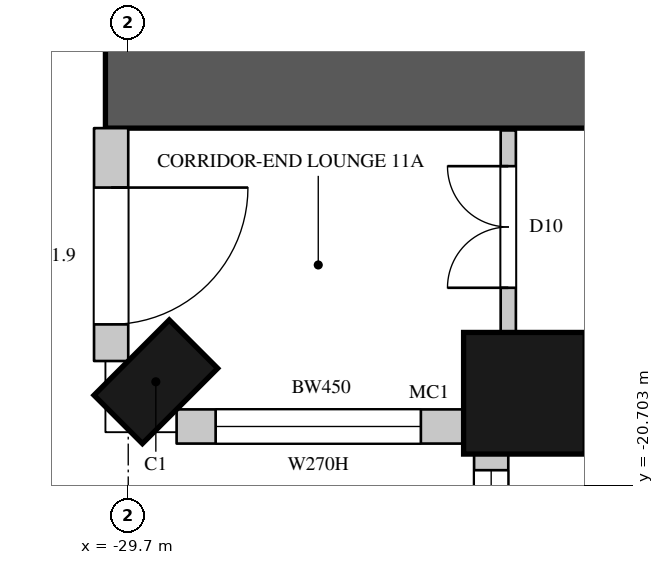
"""IFC4 building model, lengths in metres.
Left out: names, types, materials, properties, quantities, classifications, styles, units other than length and angle.
Written with IfcOpenShell. Run it as: python <this file> out.ifc"""

import sys

from ifc_helpers import new_model, si_unit, direction, frame, frame_2d, origin, origin_2d, place, context, subcontext, project, spatial, rectangle, circle, extrude, element, fill, save


model = new_model("IFC4")
c1 = context("Model", 3, precision=1e-05, world=origin(), true_north=direction((0.0, 1.0)))
c2 = subcontext(c1, "Body", "Model", "MODEL_VIEW")
j1 = project(units=[si_unit("LENGTHUNIT", "METRE"), si_unit("PLANEANGLEUNIT", "RADIAN")], contexts=[c1])
p1 = place(None, origin())
s1 = spatial("IfcSite", under=j1, at=p1, CompositionType="ELEMENT")
p2 = place(p1, origin())
s2 = spatial("IfcBuilding", under=s1, at=p2, CompositionType="ELEMENT")
p3 = place(p2, frame((0.0, 0.0, 69.9)))
s3 = spatial("IfcBuildingStorey", under=s2, at=p3, CompositionType="ELEMENT", Elevation=69.9)
p4 = place(p3, frame((-29.337, -19.337, 0.0), z_axis=(0.0, 0.0, 1.0), x_axis=(0.707106781187, -0.707106781187, 0.0)))
e1 = element("IfcColumn", 1, at=p4, inside=s3, PredefinedType="COLUMN", context=c2, shape_type="SweptSolid", body=[
    extrude(rectangle(XDim=0.9, YDim=1.4, at=origin_2d()), origin(), (0.0, 0.0, 1.0), 3.6),
])
p5 = place(p3, frame((-24.488, -19.488, 0.0), z_axis=(0.0, 0.0, 1.0), x_axis=(1.0, 0.0, 0.0)))
e2 = element("IfcColumn", 2, at=p5, inside=s3, PredefinedType="COLUMN", context=c2, shape_type="SweptSolid", body=[
    extrude(circle(Radius=0.8, at=origin_2d()), origin(), (0.0, 0.0, 1.0), 3.6),
])
p6 = place(p3, frame((-29.925, -16.0, 0.0), z_axis=(0.0, 0.0, 1.0), x_axis=(0.0, -1.0, 0.0)))
e3 = element("IfcWall", 3, at=p6, inside=s3, PredefinedType="SOLIDWALL", context=c2, shape_type="SweptSolid", body=[
    extrude(rectangle(XDim=3.064, YDim=0.45, at=frame_2d((1.532, 0.0))), origin(), (0.0, 0.0, 1.0), 3.3),
])
p7 = place(p6, frame((0.782, 0.0, 0.0)))
e4 = element("IfcOpeningElement", 4, at=p7, cuts=e3, PredefinedType="OPENING", context=c2, shape_type="SweptSolid", body=[
    extrude(rectangle(XDim=1.8, YDim=2.4, at=frame_2d((0.9, 1.2))), frame((0.0, 0.235, 0.0), z_axis=(0.0, -1.0, 0.0), x_axis=(1.0, 0.0, 0.0)), (0.0, 0.0, 1.0), 0.47),
])
p8 = place(p3, frame((-29.064, -19.925, 0.0), z_axis=(0.0, 0.0, 1.0), x_axis=(1.0, 0.0, 0.0)))
e5 = element("IfcWall", 5, at=p8, inside=s3, PredefinedType="SOLIDWALL", context=c2, shape_type="SweptSolid", body=[
    extrude(rectangle(XDim=3.805, YDim=0.45, at=frame_2d((1.903, 0.0))), origin(), (0.0, 0.0, 1.0), 3.3),
])
p9 = place(p8, frame((0.514, 0.0, 1.05)))
e6 = element("IfcOpeningElement", 6, at=p9, cuts=e5, PredefinedType="OPENING", context=c2, shape_type="SweptSolid", body=[
    extrude(rectangle(XDim=2.7, YDim=2.0, at=frame_2d((1.35, 1.0))), frame((0.0, 0.235, 0.0), z_axis=(0.0, -1.0, 0.0), x_axis=(1.0, 0.0, 0.0)), (0.0, 0.0, 1.0), 0.47),
])
p10 = place(p3, frame((-24.925, -20.259, 0.0), z_axis=(0.0, 0.0, 1.0), x_axis=(0.0, -1.0, 0.0)))
e7 = element("IfcWall", 7, at=p10, inside=s3, PredefinedType="SOLIDWALL", context=c2, shape_type="SweptSolid", body=[
    extrude(rectangle(XDim=1.792, YDim=0.45, at=frame_2d((0.896, 0.0))), origin(), (0.0, 0.0, 1.0), 3.3),
])
p11 = place(p10, frame((0.241, 0.0, 1.05)))
e8 = element("IfcOpeningElement", 8, at=p11, cuts=e7, PredefinedType="OPENING", context=c2, shape_type="SweptSolid", body=[
    extrude(rectangle(XDim=1.2, YDim=2.0, at=frame_2d((0.6, 1.0))), frame((0.0, 0.235, 0.0), z_axis=(0.0, -1.0, 0.0), x_axis=(1.0, 0.0, 0.0)), (0.0, 0.0, 1.0), 0.47),
])
p12 = place(p3, frame((-30.0, -15.4, 0.0), z_axis=(0.0, 0.0, 1.0), x_axis=(1.0, 0.0, 0.0)))
e9 = element("IfcWall", 9, at=p12, inside=s3, PredefinedType="SHEAR", context=c2, shape_type="SweptSolid", body=[
    extrude(rectangle(XDim=16.0, YDim=1.2, at=frame_2d((8.0, 0.0))), origin(), (0.0, 0.0, 1.0), 3.6),
])
p13 = place(p12, frame((13.4, 0.0, 0.0)))
e10 = element("IfcOpeningElement", 10, at=p13, cuts=e9, PredefinedType="OPENING", context=c2, shape_type="SweptSolid", body=[
    extrude(rectangle(XDim=1.5, YDim=2.4, at=frame_2d((0.75, 1.2))), frame((0.0, 0.61, 0.0), z_axis=(0.0, -1.0, 0.0), x_axis=(1.0, 0.0, 0.0)), (0.0, 0.0, 1.0), 1.22),
])
p14 = place(p3, frame((-24.7, -18.7, 0.0), z_axis=(0.0, 0.0, 1.0), x_axis=(0.0, 1.0, 0.0)))
e11 = element("IfcWall", 11, at=p14, inside=s3, PredefinedType="PARTITIONING", context=c2, shape_type="SweptSolid", body=[
    extrude(rectangle(XDim=2.67, YDim=0.2, at=frame_2d((1.335, 0.0))), origin(), (0.0, 0.0, 1.0), 3.3),
])
p15 = place(p14, frame((0.6, 0.0, 0.0)))
e12 = element("IfcOpeningElement", 12, at=p15, cuts=e11, PredefinedType="OPENING", context=c2, shape_type="SweptSolid", body=[
    extrude(rectangle(XDim=1.6, YDim=2.4, at=frame_2d((0.8, 1.2))), frame((0.0, 0.11, 0.0), z_axis=(0.0, -1.0, 0.0), x_axis=(1.0, 0.0, 0.0)), (0.0, 0.0, 1.0), 0.22),
])
p16 = place(p3, frame((-23.7, -19.7, 0.0), z_axis=(0.0, 0.0, 1.0), x_axis=(1.0, 0.0, 0.0)))
e13 = element("IfcWall", 13, at=p16, inside=s3, PredefinedType="PARTITIONING", context=c2, shape_type="SweptSolid", body=[
    extrude(rectangle(XDim=3.0, YDim=0.2, at=frame_2d((1.5, 0.0))), origin(), (0.0, 0.0, 1.0), 3.3),
])
p17 = place(p16, frame((0.8, 0.0, 0.0)))
e14 = element("IfcOpeningElement", 14, at=p17, cuts=e13, PredefinedType="OPENING", context=c2, shape_type="SweptSolid", body=[
    extrude(rectangle(XDim=0.9, YDim=2.2, at=frame_2d((0.45, 1.1))), frame((0.0, 0.11, 0.0), z_axis=(0.0, -1.0, 0.0), x_axis=(1.0, 0.0, 0.0)), (0.0, 0.0, 1.0), 0.22),
])
p18 = place(p7, origin())
e15 = element("IfcDoor", 15, at=p18, inside=s3, OperationType="SLIDING_TO_LEFT", PredefinedType="DOOR", context=c2, shape_type="SweptSolid", body=[
    extrude(rectangle(XDim=1.8, YDim=2.4, at=frame_2d((0.9, 1.2))), frame((0.0, 0.13, 0.0), z_axis=(0.0, -1.0, 0.0), x_axis=(1.0, 0.0, 0.0)), (0.0, 0.0, 1.0), 0.05),
])
fill(e4, e15)
p19 = place(p9, origin())
e16 = element("IfcWindow", 16, at=p19, inside=s3, PartitioningType="SINGLE_PANEL", PredefinedType="WINDOW", context=c2, shape_type="SweptSolid", body=[
    extrude(rectangle(XDim=2.7, YDim=2.0, at=frame_2d((1.35, 1.0))), frame((0.0, 0.135, 0.0), z_axis=(0.0, -1.0, 0.0), x_axis=(1.0, 0.0, 0.0)), (0.0, 0.0, 1.0), 0.06),
])
fill(e6, e16)
p20 = place(p11, origin())
e17 = element("IfcWindow", 17, at=p20, inside=s3, PartitioningType="SINGLE_PANEL", PredefinedType="WINDOW", context=c2, shape_type="SweptSolid", body=[
    extrude(rectangle(XDim=1.2, YDim=2.0, at=frame_2d((0.6, 1.0))), frame((0.0, 0.135, 0.0), z_axis=(0.0, -1.0, 0.0), x_axis=(1.0, 0.0, 0.0)), (0.0, 0.0, 1.0), 0.06),
])
fill(e8, e17)
p21 = place(p15, origin())
e18 = element("IfcDoor", 18, at=p21, inside=s3, OperationType="DOUBLE_DOOR_SINGLE_SWING", PredefinedType="DOOR", context=c2, shape_type="SweptSolid", body=[
    extrude(rectangle(XDim=1.6, YDim=2.4, at=frame_2d((0.8, 1.2))), frame((0.0, 0.025, 0.0), z_axis=(0.0, -1.0, 0.0), x_axis=(1.0, 0.0, 0.0)), (0.0, 0.0, 1.0), 0.05),
])
fill(e12, e18)
save(model, sys.argv[1])
